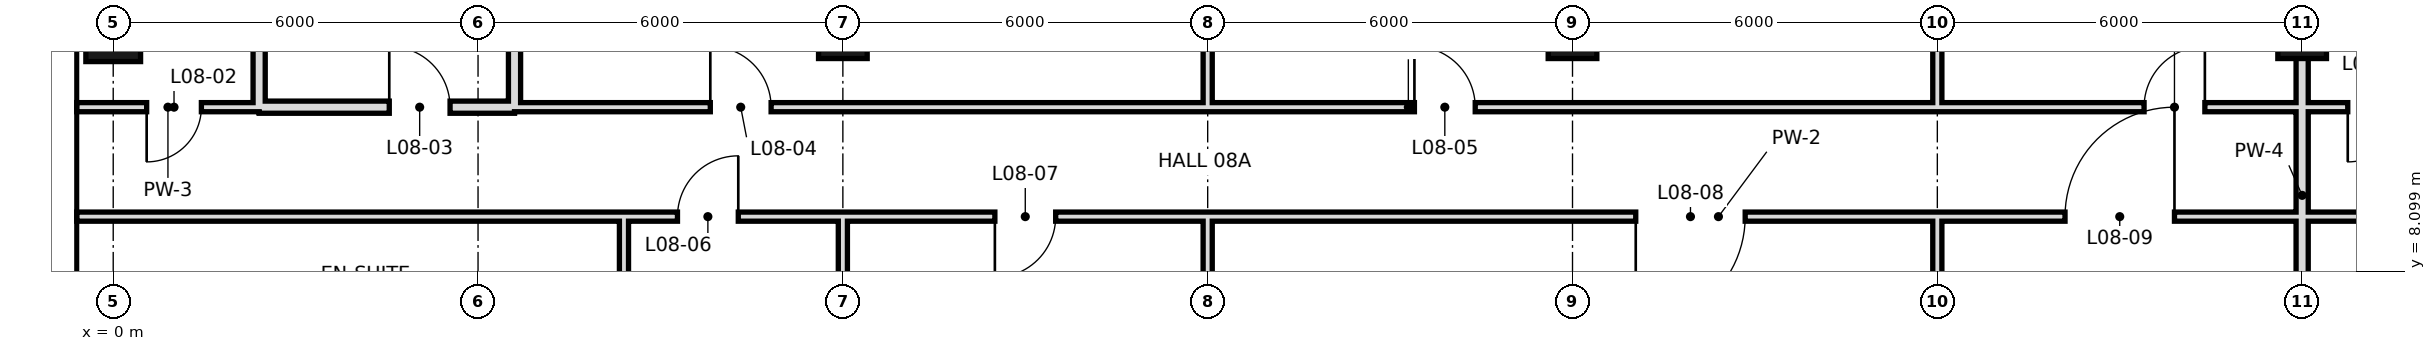
"""IFC4 building model, lengths in metres.
Left out: names, types, materials, properties, quantities, classifications, styles, units other than length and angle.
Written with IfcOpenShell. Run it as: python <this file> out.ifc"""

import sys

from ifc_helpers import new_model, si_unit, direction, frame, frame_2d, origin, origin_2d, place, context, subcontext, project, spatial, rectangle, hollow_rectangle, extrude, element, fill, save


model = new_model("IFC4")
c1 = context("Model", 3, precision=1e-05, world=origin(), true_north=direction((0.0, 1.0)))
c2 = subcontext(c1, "Body", "Model", "MODEL_VIEW")
j1 = project(units=[si_unit("LENGTHUNIT", "METRE"), si_unit("PLANEANGLEUNIT", "RADIAN")], contexts=[c1])
p1 = place(None, origin())
s1 = spatial("IfcSite", under=j1, at=p1, CompositionType="ELEMENT")
p2 = place(p1, origin())
s2 = spatial("IfcBuilding", under=s1, at=p2, CompositionType="ELEMENT")
p3 = place(p2, frame((0.0, 0.0, 49.8)))
s3 = spatial("IfcBuildingStorey", under=s2, at=p3, CompositionType="ELEMENT", Elevation=49.8)
p4 = place(p3, frame((0.0, 12.0, 0.0), z_axis=(0.0, 0.0, 1.0), x_axis=(1.0, 0.0, 0.0)))
e1 = element("IfcColumn", 1, at=p4, inside=s3, PredefinedType="COLUMN", context=c2, shape_type="SweptSolid", body=[
    extrude(hollow_rectangle(XDim=0.9, YDim=0.9, WallThickness=0.045, at=origin_2d()), origin(), (0.0, 0.0, 1.0), 3.6),
])
for number, where, z_axis, x_axis in (
    (2, (12.0, 12.0, 0.0), (0.0, 0.0, 1.0), (1.0, 0.0, 0.0)),
    (3, (24.0, 12.0, 0.0), (0.0, 0.0, 1.0), (1.0, 0.0, 0.0)),
    (4, (36.0, 12.0, 0.0), (0.0, 0.0, 1.0), (1.0, 0.0, 0.0)),
):
    element("IfcColumn", number, at=place(p3, frame(where, z_axis=z_axis, x_axis=x_axis)), inside=s3, PredefinedType="COLUMN", context=c2, shape_type="SweptSolid", body=[
        extrude(hollow_rectangle(XDim=0.8, YDim=0.8, WallThickness=0.04, at=origin_2d()), origin(), (0.0, 0.0, 1.0), 3.6),
    ])
p5 = place(p3, frame((12.0, 0.0, 0.0), z_axis=(0.0, 0.0, 1.0), x_axis=(0.0, 1.0, 0.0)))
e5 = element("IfcWall", 5, at=p5, inside=s3, PredefinedType="PARTITIONING", context=c2, shape_type="SweptSolid", body=[
    extrude(rectangle(XDim=9.0, YDim=0.15, at=frame_2d((4.5, 0.0))), origin(), (0.0, 0.0, 1.0), 2.72),
])
p6 = place(p3, frame((18.0, -0.6, 0.0), z_axis=(0.0, 0.0, 1.0), x_axis=(0.0, 1.0, 0.0)))
e6 = element("IfcWall", 6, at=p6, inside=s3, PredefinedType="PARTITIONING", context=c2, shape_type="SweptSolid", body=[
    extrude(rectangle(XDim=9.6, YDim=0.15, at=frame_2d((4.8, 0.0))), origin(), (0.0, 0.0, 1.0), 2.72),
])
p7 = place(p3, frame((18.0, 10.8, 0.0), z_axis=(0.0, 0.0, 1.0), x_axis=(0.0, 1.0, 0.0)))
e7 = element("IfcWall", 7, at=p7, inside=s3, PredefinedType="PARTITIONING", context=c2, shape_type="SweptSolid", body=[
    extrude(rectangle(XDim=7.9, YDim=0.15, at=frame_2d((3.95, 0.0))), origin(), (0.0, 0.0, 1.0), 2.72),
])
p8 = place(p3, frame((2.4, 10.8, 0.0), z_axis=(0.0, 0.0, 1.0), x_axis=(0.0, 1.0, 0.0)))
e8 = element("IfcWall", 8, at=p8, inside=s3, PredefinedType="SOLIDWALL", context=c2, shape_type="SweptSolid", body=[
    extrude(rectangle(XDim=7.2, YDim=0.2, at=frame_2d((3.6, 0.0))), origin(), (0.0, 0.0, 1.0), 2.72),
])
p9 = place(p3, frame((30.0, -0.6, 0.0), z_axis=(0.0, 0.0, 1.0), x_axis=(0.0, 1.0, 0.0)))
e9 = element("IfcWall", 9, at=p9, inside=s3, PredefinedType="PARTITIONING", context=c2, shape_type="SweptSolid", body=[
    extrude(rectangle(XDim=9.6, YDim=0.15, at=frame_2d((4.8, 0.0))), origin(), (0.0, 0.0, 1.0), 2.72),
])
p10 = place(p3, frame((30.0, 10.8, 0.0), z_axis=(0.0, 0.0, 1.0), x_axis=(0.0, 1.0, 0.0)))
e10 = element("IfcWall", 10, at=p10, inside=s3, PredefinedType="PARTITIONING", context=c2, shape_type="SweptSolid", body=[
    extrude(rectangle(XDim=7.9, YDim=0.15, at=frame_2d((3.95, 0.0))), origin(), (0.0, 0.0, 1.0), 2.72),
])
p11 = place(p3, frame((36.0, 0.0, 0.0), z_axis=(0.0, 0.0, 1.0), x_axis=(0.0, 1.0, 0.0)))
e11 = element("IfcWall", 11, at=p11, inside=s3, PredefinedType="SOLIDWALL", context=c2, shape_type="SweptSolid", body=[
    extrude(rectangle(XDim=18.7, YDim=0.2, at=frame_2d((9.35, 0.0))), origin(), (0.0, 0.0, 1.0), 2.72),
])
p12 = place(p3, frame((6.6, 10.8, 0.0), z_axis=(0.0, 0.0, 1.0), x_axis=(0.0, 1.0, 0.0)))
e12 = element("IfcWall", 12, at=p12, inside=s3, PredefinedType="SOLIDWALL", context=c2, shape_type="SweptSolid", body=[
    extrude(rectangle(XDim=7.9, YDim=0.2, at=frame_2d((3.95, 0.0))), origin(), (0.0, 0.0, 1.0), 2.72),
])
p13 = place(p3, frame((8.4, 6.0, 0.0), z_axis=(0.0, 0.0, 1.0), x_axis=(0.0, 1.0, 0.0)))
e13 = element("IfcWall", 13, at=p13, inside=s3, PredefinedType="PARTITIONING", context=c2, shape_type="SweptSolid", body=[
    extrude(rectangle(XDim=3.0, YDim=0.15, at=frame_2d((1.5, 0.0))), origin(), (0.0, 0.0, 1.0), 3.42),
])
p14 = place(p3, frame((2.4, 10.8, 0.0), z_axis=(0.0, 0.0, 1.0), x_axis=(1.0, 0.0, 0.0)))
e14 = element("IfcWall", 14, at=p14, inside=s3, PredefinedType="SOLIDWALL", context=c2, shape_type="SweptSolid", body=[
    extrude(rectangle(XDim=4.2, YDim=0.2, at=frame_2d((2.1, 0.0))), origin(), (0.0, 0.0, 1.0), 2.72),
])
p15 = place(p14, frame((2.14, 0.0, 0.0)))
e15 = element("IfcOpeningElement", 15, at=p15, cuts=e14, PredefinedType="OPENING", context=c2, shape_type="SweptSolid", body=[
    extrude(rectangle(XDim=1.0, YDim=2.4, at=frame_2d((0.5, 1.2))), frame((0.0, 0.11, 0.0), z_axis=(0.0, -1.0, 0.0), x_axis=(1.0, 0.0, 0.0)), (0.0, 0.0, 1.0), 0.22),
])
p16 = place(p3, frame((6.6, 10.8, 0.0), z_axis=(0.0, 0.0, 1.0), x_axis=(1.0, 0.0, 0.0)))
e16 = element("IfcWall", 16, at=p16, inside=s3, PredefinedType="PARTITIONING", context=c2, shape_type="SweptSolid", body=[
    extrude(rectangle(XDim=29.4, YDim=0.15, at=frame_2d((14.7, 0.0))), origin(), (0.0, 0.0, 1.0), 3.42),
])
p17 = place(p16, frame((26.8, 0.0, 0.0)))
e17 = element("IfcOpeningElement", 17, at=p17, cuts=e16, PredefinedType="OPENING", context=c2, shape_type="SweptSolid", body=[
    extrude(rectangle(XDim=1.0, YDim=2.4, at=frame_2d((0.5, 1.2))), frame((0.0, 0.085, 0.0), z_axis=(0.0, -1.0, 0.0), x_axis=(1.0, 0.0, 0.0)), (0.0, 0.0, 1.0), 0.17),
])
p18 = place(p16, frame((3.22, 0.0, 0.0)))
e18 = element("IfcOpeningElement", 18, at=p18, cuts=e16, PredefinedType="OPENING", context=c2, shape_type="SweptSolid", body=[
    extrude(rectangle(XDim=1.0, YDim=2.4, at=frame_2d((0.5, 1.2))), frame((0.0, 0.085, 0.0), z_axis=(0.0, -1.0, 0.0), x_axis=(1.0, 0.0, 0.0)), (0.0, 0.0, 1.0), 0.17),
])
p19 = place(p16, frame((14.8, 0.0, 0.0)))
e19 = element("IfcOpeningElement", 19, at=p19, cuts=e16, PredefinedType="OPENING", context=c2, shape_type="SweptSolid", body=[
    extrude(rectangle(XDim=1.0, YDim=2.4, at=frame_2d((0.5, 1.2))), frame((0.0, 0.085, 0.0), z_axis=(0.0, -1.0, 0.0), x_axis=(1.0, 0.0, 0.0)), (0.0, 0.0, 1.0), 0.17),
])
p20 = place(p3, frame((-0.6, 10.8, 0.0), z_axis=(0.0, 0.0, 1.0), x_axis=(1.0, 0.0, 0.0)))
e20 = element("IfcWall", 20, at=p20, inside=s3, PredefinedType="PARTITIONING", context=c2, shape_type="SweptSolid", body=[
    extrude(rectangle(XDim=3.0, YDim=0.15, at=frame_2d((1.5, 0.0))), origin(), (0.0, 0.0, 1.0), 3.42),
])
p21 = place(p20, frame((1.15, 0.0, 0.0)))
e21 = element("IfcOpeningElement", 21, at=p21, cuts=e20, PredefinedType="OPENING", context=c2, shape_type="SweptSolid", body=[
    extrude(rectangle(XDim=0.9, YDim=2.4, at=frame_2d((0.45, 1.2))), frame((0.0, 0.085, 0.0), z_axis=(0.0, -1.0, 0.0), x_axis=(1.0, 0.0, 0.0)), (0.0, 0.0, 1.0), 0.17),
])
p22 = place(p3, frame((36.0, 10.8, 0.0), z_axis=(0.0, 0.0, 1.0), x_axis=(1.0, 0.0, 0.0)))
e22 = element("IfcWall", 22, at=p22, inside=s3, PredefinedType="PARTITIONING", context=c2, shape_type="SweptSolid", body=[
    extrude(rectangle(XDim=2.4, YDim=0.15, at=frame_2d((1.2, 0.0))), origin(), (0.0, 0.0, 1.0), 3.42),
])
p23 = place(p22, frame((0.75, 0.0, 0.0)))
e23 = element("IfcOpeningElement", 23, at=p23, cuts=e22, PredefinedType="OPENING", context=c2, shape_type="SweptSolid", body=[
    extrude(rectangle(XDim=0.9, YDim=2.4, at=frame_2d((0.45, 1.2))), frame((0.0, 0.085, 0.0), z_axis=(0.0, -1.0, 0.0), x_axis=(1.0, 0.0, 0.0)), (0.0, 0.0, 1.0), 0.17),
])
p24 = place(p3, frame((8.4, 9.0, 0.0), z_axis=(0.0, 0.0, 1.0), x_axis=(1.0, 0.0, 0.0)))
e24 = element("IfcWall", 24, at=p24, inside=s3, PredefinedType="PARTITIONING", context=c2, shape_type="SweptSolid", body=[
    extrude(rectangle(XDim=36.0, YDim=0.15, at=frame_2d((18.0, 0.0))), origin(), (0.0, 0.0, 1.0), 3.42),
])
p25 = place(p24, frame((0.88, 0.0, 0.0)))
e25 = element("IfcOpeningElement", 25, at=p25, cuts=e24, PredefinedType="OPENING", context=c2, shape_type="SweptSolid", body=[
    extrude(rectangle(XDim=1.0, YDim=2.4, at=frame_2d((0.5, 1.2))), frame((0.0, 0.085, 0.0), z_axis=(0.0, -1.0, 0.0), x_axis=(1.0, 0.0, 0.0)), (0.0, 0.0, 1.0), 0.17),
])
p26 = place(p24, frame((6.1, 0.0, 0.0)))
e26 = element("IfcOpeningElement", 26, at=p26, cuts=e24, PredefinedType="OPENING", context=c2, shape_type="SweptSolid", body=[
    extrude(rectangle(XDim=1.0, YDim=2.4, at=frame_2d((0.5, 1.2))), frame((0.0, 0.085, 0.0), z_axis=(0.0, -1.0, 0.0), x_axis=(1.0, 0.0, 0.0)), (0.0, 0.0, 1.0), 0.17),
])
p27 = place(p24, frame((16.64, 0.0, 0.0)))
e27 = element("IfcOpeningElement", 27, at=p27, cuts=e24, PredefinedType="OPENING", context=c2, shape_type="SweptSolid", body=[
    extrude(rectangle(XDim=1.8, YDim=2.4, at=frame_2d((0.9, 1.2))), frame((0.0, 0.085, 0.0), z_axis=(0.0, -1.0, 0.0), x_axis=(1.0, 0.0, 0.0)), (0.0, 0.0, 1.0), 0.17),
])
p28 = place(p24, frame((23.7, 0.0, 0.0)))
e28 = element("IfcOpeningElement", 28, at=p28, cuts=e24, PredefinedType="OPENING", context=c2, shape_type="SweptSolid", body=[
    extrude(rectangle(XDim=1.8, YDim=2.4, at=frame_2d((0.9, 1.2))), frame((0.0, 0.085, 0.0), z_axis=(0.0, -1.0, 0.0), x_axis=(1.0, 0.0, 0.0)), (0.0, 0.0, 1.0), 0.17),
])
p29 = place(p24, frame((30.1, 0.0, 0.0)))
e29 = element("IfcOpeningElement", 29, at=p29, cuts=e24, PredefinedType="OPENING", context=c2, shape_type="SweptSolid", body=[
    extrude(rectangle(XDim=1.0, YDim=2.4, at=frame_2d((0.5, 1.2))), frame((0.0, 0.085, 0.0), z_axis=(0.0, -1.0, 0.0), x_axis=(1.0, 0.0, 0.0)), (0.0, 0.0, 1.0), 0.17),
])
p30 = place(p24, frame((34.12, 0.0, 0.0)))
e30 = element("IfcOpeningElement", 30, at=p30, cuts=e24, PredefinedType="OPENING", context=c2, shape_type="SweptSolid", body=[
    extrude(rectangle(XDim=1.0, YDim=2.4, at=frame_2d((0.5, 1.2))), frame((0.0, 0.085, 0.0), z_axis=(0.0, -1.0, 0.0), x_axis=(1.0, 0.0, 0.0)), (0.0, 0.0, 1.0), 0.17),
])
p31 = place(p3, frame((-0.6, 9.0, 0.0), z_axis=(0.0, 0.0, 1.0), x_axis=(1.0, 0.0, 0.0)))
e31 = element("IfcWall", 31, at=p31, inside=s3, PredefinedType="PARTITIONING", context=c2, shape_type="SweptSolid", body=[
    extrude(rectangle(XDim=9.0, YDim=0.15, at=frame_2d((4.5, 0.0))), origin(), (0.0, 0.0, 1.0), 3.42),
])
p32 = place(p17, frame((1.0, 0.0, 0.0), z_axis=(0.0, 0.0, 1.0), x_axis=(-1.0, 0.0, 0.0)))
e32 = element("IfcDoor", 32, at=p32, inside=s3, OperationType="SINGLE_SWING_LEFT", PredefinedType="DOOR", context=c2, shape_type="SweptSolid", body=[
    extrude(rectangle(XDim=1.0, YDim=2.4, at=frame_2d((0.5, 1.2))), frame((0.0, 0.025, 0.0), z_axis=(0.0, -1.0, 0.0), x_axis=(1.0, 0.0, 0.0)), (0.0, 0.0, 1.0), 0.05),
])
fill(e17, e32)
p33 = place(p21, frame((0.9, 0.0, 0.0), z_axis=(0.0, 0.0, 1.0), x_axis=(-1.0, 0.0, 0.0)))
e33 = element("IfcDoor", 33, at=p33, inside=s3, OperationType="SINGLE_SWING_RIGHT", PredefinedType="DOOR", context=c2, shape_type="SweptSolid", body=[
    extrude(rectangle(XDim=0.9, YDim=2.4, at=frame_2d((0.45, 1.2))), frame((0.0, 0.025, 0.0), z_axis=(0.0, -1.0, 0.0), x_axis=(1.0, 0.0, 0.0)), (0.0, 0.0, 1.0), 0.05),
])
fill(e21, e33)
p34 = place(p15, origin())
e34 = element("IfcDoor", 34, at=p34, inside=s3, OperationType="SINGLE_SWING_LEFT", PredefinedType="DOOR", context=c2, shape_type="SweptSolid", body=[
    extrude(rectangle(XDim=1.0, YDim=2.4, at=frame_2d((0.5, 1.2))), frame((0.0, 0.025, 0.0), z_axis=(0.0, -1.0, 0.0), x_axis=(1.0, 0.0, 0.0)), (0.0, 0.0, 1.0), 0.05),
])
fill(e15, e34)
p35 = place(p18, origin())
e35 = element("IfcDoor", 35, at=p35, inside=s3, OperationType="SINGLE_SWING_LEFT", PredefinedType="DOOR", context=c2, shape_type="SweptSolid", body=[
    extrude(rectangle(XDim=1.0, YDim=2.4, at=frame_2d((0.5, 1.2))), frame((0.0, 0.025, 0.0), z_axis=(0.0, -1.0, 0.0), x_axis=(1.0, 0.0, 0.0)), (0.0, 0.0, 1.0), 0.05),
])
fill(e18, e35)
p36 = place(p19, origin())
e36 = element("IfcDoor", 36, at=p36, inside=s3, OperationType="SINGLE_SWING_LEFT", PredefinedType="DOOR", context=c2, shape_type="SweptSolid", body=[
    extrude(rectangle(XDim=1.0, YDim=2.4, at=frame_2d((0.5, 1.2))), frame((0.0, 0.025, 0.0), z_axis=(0.0, -1.0, 0.0), x_axis=(1.0, 0.0, 0.0)), (0.0, 0.0, 1.0), 0.05),
])
fill(e19, e36)
p37 = place(p25, frame((1.0, 0.0, 0.0), z_axis=(0.0, 0.0, 1.0), x_axis=(-1.0, 0.0, 0.0)))
e37 = element("IfcDoor", 37, at=p37, inside=s3, OperationType="SINGLE_SWING_LEFT", PredefinedType="DOOR", context=c2, shape_type="SweptSolid", body=[
    extrude(rectangle(XDim=1.0, YDim=2.4, at=frame_2d((0.5, 1.2))), frame((0.0, 0.025, 0.0), z_axis=(0.0, -1.0, 0.0), x_axis=(1.0, 0.0, 0.0)), (0.0, 0.0, 1.0), 0.05),
])
fill(e25, e37)
p38 = place(p26, frame((1.0, 0.0, 0.0), z_axis=(0.0, 0.0, 1.0), x_axis=(-1.0, 0.0, 0.0)))
e38 = element("IfcDoor", 38, at=p38, inside=s3, OperationType="SINGLE_SWING_RIGHT", PredefinedType="DOOR", context=c2, shape_type="SweptSolid", body=[
    extrude(rectangle(XDim=1.0, YDim=2.4, at=frame_2d((0.5, 1.2))), frame((0.0, 0.025, 0.0), z_axis=(0.0, -1.0, 0.0), x_axis=(1.0, 0.0, 0.0)), (0.0, 0.0, 1.0), 0.05),
])
fill(e26, e38)
p39 = place(p27, frame((1.8, 0.0, 0.0), z_axis=(0.0, 0.0, 1.0), x_axis=(-1.0, 0.0, 0.0)))
e39 = element("IfcDoor", 39, at=p39, inside=s3, OperationType="SINGLE_SWING_RIGHT", PredefinedType="DOOR", context=c2, shape_type="SweptSolid", body=[
    extrude(rectangle(XDim=1.8, YDim=2.4, at=frame_2d((0.9, 1.2))), frame((0.0, 0.025, 0.0), z_axis=(0.0, -1.0, 0.0), x_axis=(1.0, 0.0, 0.0)), (0.0, 0.0, 1.0), 0.05),
])
fill(e27, e39)
p40 = place(p28, frame((1.8, 0.0, 0.0), z_axis=(0.0, 0.0, 1.0), x_axis=(-1.0, 0.0, 0.0)))
e40 = element("IfcDoor", 40, at=p40, inside=s3, OperationType="SINGLE_SWING_LEFT", PredefinedType="DOOR", context=c2, shape_type="SweptSolid", body=[
    extrude(rectangle(XDim=1.8, YDim=2.4, at=frame_2d((0.9, 1.2))), frame((0.0, 0.025, 0.0), z_axis=(0.0, -1.0, 0.0), x_axis=(1.0, 0.0, 0.0)), (0.0, 0.0, 1.0), 0.05),
])
fill(e28, e40)
p41 = place(p23, frame((0.9, 0.0, 0.0), z_axis=(0.0, 0.0, 1.0), x_axis=(-1.0, 0.0, 0.0)))
e41 = element("IfcDoor", 41, at=p41, inside=s3, OperationType="SINGLE_SWING_RIGHT", PredefinedType="DOOR", context=c2, shape_type="SweptSolid", body=[
    extrude(rectangle(XDim=0.9, YDim=2.4, at=frame_2d((0.45, 1.2))), frame((0.0, 0.025, 0.0), z_axis=(0.0, -1.0, 0.0), x_axis=(1.0, 0.0, 0.0)), (0.0, 0.0, 1.0), 0.05),
])
fill(e23, e41)
save(model, sys.argv[1])
